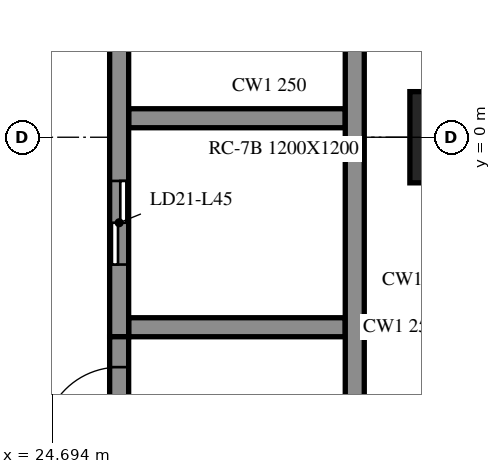
"""IFC4 building model, lengths in metres.
Left out: names, types, materials, properties, quantities, classifications, styles, units other than length and angle.
Written with IfcOpenShell. Run it as: python <this file> out.ifc"""

import sys

from ifc_helpers import new_model, si_unit, direction, frame, frame_2d, origin, origin_2d, place, context, subcontext, project, spatial, rectangle, extrude, element, fill, save


model = new_model("IFC4")
c1 = context("Model", 3, precision=1e-05, world=origin(), true_north=direction((0.0, 1.0)))
c2 = subcontext(c1, "Body", "Model", "MODEL_VIEW")
j1 = project(units=[si_unit("LENGTHUNIT", "METRE"), si_unit("PLANEANGLEUNIT", "RADIAN")], contexts=[c1])
p1 = place(None, origin())
s1 = spatial("IfcSite", under=j1, at=p1, CompositionType="ELEMENT")
p2 = place(p1, origin())
s2 = spatial("IfcBuilding", under=s1, at=p2, CompositionType="ELEMENT")
p3 = place(p2, frame((0.0, 0.0, 189.6)))
s3 = spatial("IfcBuildingStorey", under=s2, at=p3, CompositionType="ELEMENT", Elevation=189.6)
p4 = place(p3, frame((30.0, 0.0, -0.4), z_axis=(0.0, 0.0, 1.0), x_axis=(1.0, 0.0, 0.0)))
e1 = element("IfcColumn", 1, at=p4, inside=s3, PredefinedType="COLUMN", context=c2, shape_type="SweptSolid", body=[
    extrude(rectangle(XDim=1.2, YDim=1.2, at=origin_2d()), origin(), (0.0, 0.0, 1.0), 4.36),
])
p5 = place(p3, frame((28.675, -9.125, 0.0), z_axis=(0.0, 0.0, 1.0), x_axis=(0.0, 1.0, 0.0)))
e2 = element("IfcWall", 2, at=p5, inside=s3, PredefinedType="SOLIDWALL", context=c2, shape_type="SweptSolid", body=[
    extrude(rectangle(XDim=24.25, YDim=0.25, at=frame_2d((12.125, 0.0))), origin(), (0.0, 0.0, 1.0), 3.96),
])
p6 = place(p5, frame((13.075, 0.0, 0.0)))
e3 = element("IfcOpeningElement", 3, at=p6, cuts=e2, PredefinedType="OPENING", context=c2, shape_type="SweptSolid", body=[
    extrude(rectangle(XDim=0.9, YDim=2.1, at=frame_2d((0.45, 1.05))), frame((0.0, 0.135, 0.0), z_axis=(0.0, -1.0, 0.0), x_axis=(1.0, 0.0, 0.0)), (0.0, 0.0, 1.0), 0.27),
])
p7 = place(p5, frame((15.775, 0.0, 0.0)))
e4 = element("IfcOpeningElement", 4, at=p7, cuts=e2, PredefinedType="OPENING", context=c2, shape_type="SweptSolid", body=[
    extrude(rectangle(XDim=0.9, YDim=2.1, at=frame_2d((0.45, 1.05))), frame((0.0, 0.135, 0.0), z_axis=(0.0, -1.0, 0.0), x_axis=(1.0, 0.0, 0.0)), (0.0, 0.0, 1.0), 0.27),
])
p8 = place(p5, frame((19.125, 0.0, 0.0)))
e5 = element("IfcOpeningElement", 5, at=p8, cuts=e2, PredefinedType="OPENING", context=c2, shape_type="SweptSolid", body=[
    extrude(rectangle(XDim=0.9, YDim=2.1, at=frame_2d((0.45, 1.05))), frame((0.0, 0.135, 0.0), z_axis=(0.0, -1.0, 0.0), x_axis=(1.0, 0.0, 0.0)), (0.0, 0.0, 1.0), 0.27),
])
p9 = place(p5, frame((22.587, 0.0, 0.0)))
e6 = element("IfcOpeningElement", 6, at=p9, cuts=e2, PredefinedType="OPENING", context=c2, shape_type="SweptSolid", body=[
    extrude(rectangle(XDim=0.9, YDim=2.1, at=frame_2d((0.45, 1.05))), frame((0.0, 0.135, 0.0), z_axis=(0.0, -1.0, 0.0), x_axis=(1.0, 0.0, 0.0)), (0.0, 0.0, 1.0), 0.27),
])
p10 = place(p3, frame((25.575, -8.875, 0.0), z_axis=(0.0, 0.0, 1.0), x_axis=(0.0, 1.0, 0.0)))
e7 = element("IfcWall", 7, at=p10, inside=s3, PredefinedType="SOLIDWALL", context=c2, shape_type="SweptSolid", body=[
    extrude(rectangle(XDim=6.25, YDim=0.25, at=frame_2d((3.125, 0.0))), origin(), (0.0, 0.0, 1.0), 3.96),
])
p11 = place(p10, frame((4.85, 0.0, 0.0)))
e8 = element("IfcOpeningElement", 8, at=p11, cuts=e7, PredefinedType="OPENING", context=c2, shape_type="SweptSolid", body=[
    extrude(rectangle(XDim=1.0, YDim=2.1, at=frame_2d((0.5, 1.05))), frame((0.0, 0.135, 0.0), z_axis=(0.0, -1.0, 0.0), x_axis=(1.0, 0.0, 0.0)), (0.0, 0.0, 1.0), 0.27),
])
p12 = place(p3, frame((25.575, 14.875, 0.0), z_axis=(0.0, 0.0, 1.0), x_axis=(0.0, -1.0, 0.0)))
e9 = element("IfcWall", 9, at=p12, inside=s3, PredefinedType="SOLIDWALL", context=c2, shape_type="SweptSolid", body=[
    extrude(rectangle(XDim=17.5, YDim=0.25, at=frame_2d((8.75, 0.0))), origin(), (0.0, 0.0, 1.0), 3.96),
])
p13 = place(p12, frame((15.45, 0.0, 0.0)))
e10 = element("IfcOpeningElement", 10, at=p13, cuts=e9, PredefinedType="OPENING", context=c2, shape_type="SweptSolid", body=[
    extrude(rectangle(XDim=1.1, YDim=2.1, at=frame_2d((0.55, 1.05))), frame((0.0, 0.135, 0.0), z_axis=(0.0, -1.0, 0.0), x_axis=(1.0, 0.0, 0.0)), (0.0, 0.0, 1.0), 0.27),
])
p14 = place(p12, frame((12.8, 0.0, 0.0)))
e11 = element("IfcOpeningElement", 11, at=p14, cuts=e9, PredefinedType="OPENING", context=c2, shape_type="SweptSolid", body=[
    extrude(rectangle(XDim=0.9, YDim=2.1, at=frame_2d((0.45, 1.05))), frame((0.0, 0.135, 0.0), z_axis=(0.0, -1.0, 0.0), x_axis=(1.0, 0.0, 0.0)), (0.0, 0.0, 1.0), 0.27),
])
for number, where, z_axis, x_axis in (
    (12, (25.7, -2.5, 0.0), (0.0, 0.0, 1.0), (1.0, 0.0, 0.0)),
    (13, (25.7, 0.25, 0.0), (0.0, 0.0, 1.0), (1.0, 0.0, 0.0)),
):
    element("IfcWall", number, at=place(p3, frame(where, z_axis=z_axis, x_axis=x_axis)), inside=s3, PredefinedType="SOLIDWALL", context=c2, shape_type="SweptSolid", body=[
        extrude(rectangle(XDim=2.85, YDim=0.25, at=frame_2d((1.425, 0.0))), origin(), (0.0, 0.0, 1.0), 3.96),
    ])
p15 = place(p13, origin())
e14 = element("IfcDoor", 14, at=p15, inside=s3, OperationType="DOUBLE_DOOR_SLIDING", PredefinedType="DOOR", context=c2, shape_type="SweptSolid", body=[
    extrude(rectangle(XDim=1.1, YDim=2.1, at=frame_2d((0.55, 1.05))), frame((0.0, 0.025, 0.0), z_axis=(0.0, -1.0, 0.0), x_axis=(1.0, 0.0, 0.0)), (0.0, 0.0, 1.0), 0.05),
])
fill(e10, e14)
p16 = place(p11, origin())
e15 = element("IfcDoor", 15, at=p16, inside=s3, OperationType="SINGLE_SWING_RIGHT", PredefinedType="DOOR", context=c2, shape_type="SweptSolid", body=[
    extrude(rectangle(XDim=1.0, YDim=2.1, at=frame_2d((0.5, 1.05))), frame((0.0, 0.025, 0.0), z_axis=(0.0, -1.0, 0.0), x_axis=(1.0, 0.0, 0.0)), (0.0, 0.0, 1.0), 0.05),
])
fill(e8, e15)
save(model, sys.argv[1])
